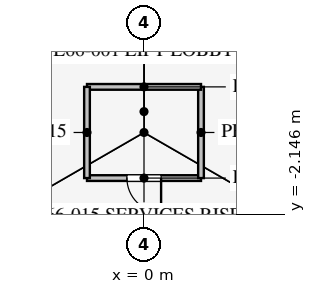
"""IFC4 building model, lengths in metres.
Left out: names, types, materials, properties, quantities, classifications, styles, units other than length and angle.
Written with IfcOpenShell. Run it as: python <this file> out.ifc"""

import sys

from ifc_helpers import new_model, si_unit, direction, frame, frame_2d, origin, place, context, subcontext, project, spatial, rectangle, extrude, element, fill, save


model = new_model("IFC4")
c1 = context("Model", 3, precision=1e-05, world=origin(), true_north=direction((0.0, 1.0)))
c2 = subcontext(c1, "Body", "Model", "MODEL_VIEW")
j1 = project(units=[si_unit("LENGTHUNIT", "METRE"), si_unit("PLANEANGLEUNIT", "RADIAN")], contexts=[c1])
p1 = place(None, origin())
s1 = spatial("IfcSite", under=j1, at=p1, CompositionType="ELEMENT")
p2 = place(p1, origin())
s2 = spatial("IfcBuilding", under=s1, at=p2, CompositionType="ELEMENT")
p3 = place(p2, frame((0.0, 0.0, 288.9)))
s3 = spatial("IfcBuildingStorey", under=s2, at=p3, CompositionType="ELEMENT", Elevation=288.9)
p4 = place(p3, frame((-1.5, -1.2, 0.0), z_axis=(0.0, 0.0, 1.0), x_axis=(1.0, 0.0, 0.0)))
e1 = element("IfcWall", 1, at=p4, inside=s3, PredefinedType="PARTITIONING", context=c2, shape_type="SweptSolid", body=[
    extrude(rectangle(XDim=3.0, YDim=0.15, at=frame_2d((1.5, 0.0))), origin(), (0.0, 0.0, 1.0), 4.0),
])
p5 = place(p4, frame((1.05, 0.0, 0.0)))
e2 = element("IfcOpeningElement", 2, at=p5, cuts=e1, PredefinedType="OPENING", context=c2, shape_type="SweptSolid", body=[
    extrude(rectangle(XDim=0.9, YDim=2.1, at=frame_2d((0.45, 1.05))), frame((0.0, 0.085, 0.0), z_axis=(0.0, -1.0, 0.0), x_axis=(1.0, 0.0, 0.0)), (0.0, 0.0, 1.0), 0.17),
])
p6 = place(p3, frame((1.5, -1.2, 0.0), z_axis=(0.0, 0.0, 1.0), x_axis=(0.0, 1.0, 0.0)))
e3 = element("IfcWall", 3, at=p6, inside=s3, PredefinedType="PARTITIONING", context=c2, shape_type="SweptSolid", body=[
    extrude(rectangle(XDim=2.4, YDim=0.15, at=frame_2d((1.2, 0.0))), origin(), (0.0, 0.0, 1.0), 4.0),
])
p7 = place(p3, frame((1.5, 1.2, 0.0), z_axis=(0.0, 0.0, 1.0), x_axis=(-1.0, 0.0, 0.0)))
e4 = element("IfcWall", 4, at=p7, inside=s3, PredefinedType="PARTITIONING", context=c2, shape_type="SweptSolid", body=[
    extrude(rectangle(XDim=3.0, YDim=0.15, at=frame_2d((1.5, 0.0))), origin(), (0.0, 0.0, 1.0), 4.0),
])
p8 = place(p3, frame((-1.5, 1.2, 0.0), z_axis=(0.0, 0.0, 1.0), x_axis=(0.0, -1.0, 0.0)))
e5 = element("IfcWall", 5, at=p8, inside=s3, PredefinedType="PARTITIONING", context=c2, shape_type="SweptSolid", body=[
    extrude(rectangle(XDim=2.4, YDim=0.15, at=frame_2d((1.2, 0.0))), origin(), (0.0, 0.0, 1.0), 4.0),
])
p9 = place(p5, frame((0.9, 0.0, 0.0), z_axis=(0.0, 0.0, 1.0), x_axis=(-1.0, 0.0, 0.0)))
e6 = element("IfcDoor", 6, at=p9, inside=s3, OperationType="SINGLE_SWING_LEFT", PredefinedType="DOOR", context=c2, shape_type="SweptSolid", body=[
    extrude(rectangle(XDim=0.9, YDim=2.1, at=frame_2d((0.45, 1.05))), frame((0.0, 0.025, 0.0), z_axis=(0.0, -1.0, 0.0), x_axis=(1.0, 0.0, 0.0)), (0.0, 0.0, 1.0), 0.05),
])
fill(e2, e6)
save(model, sys.argv[1])
